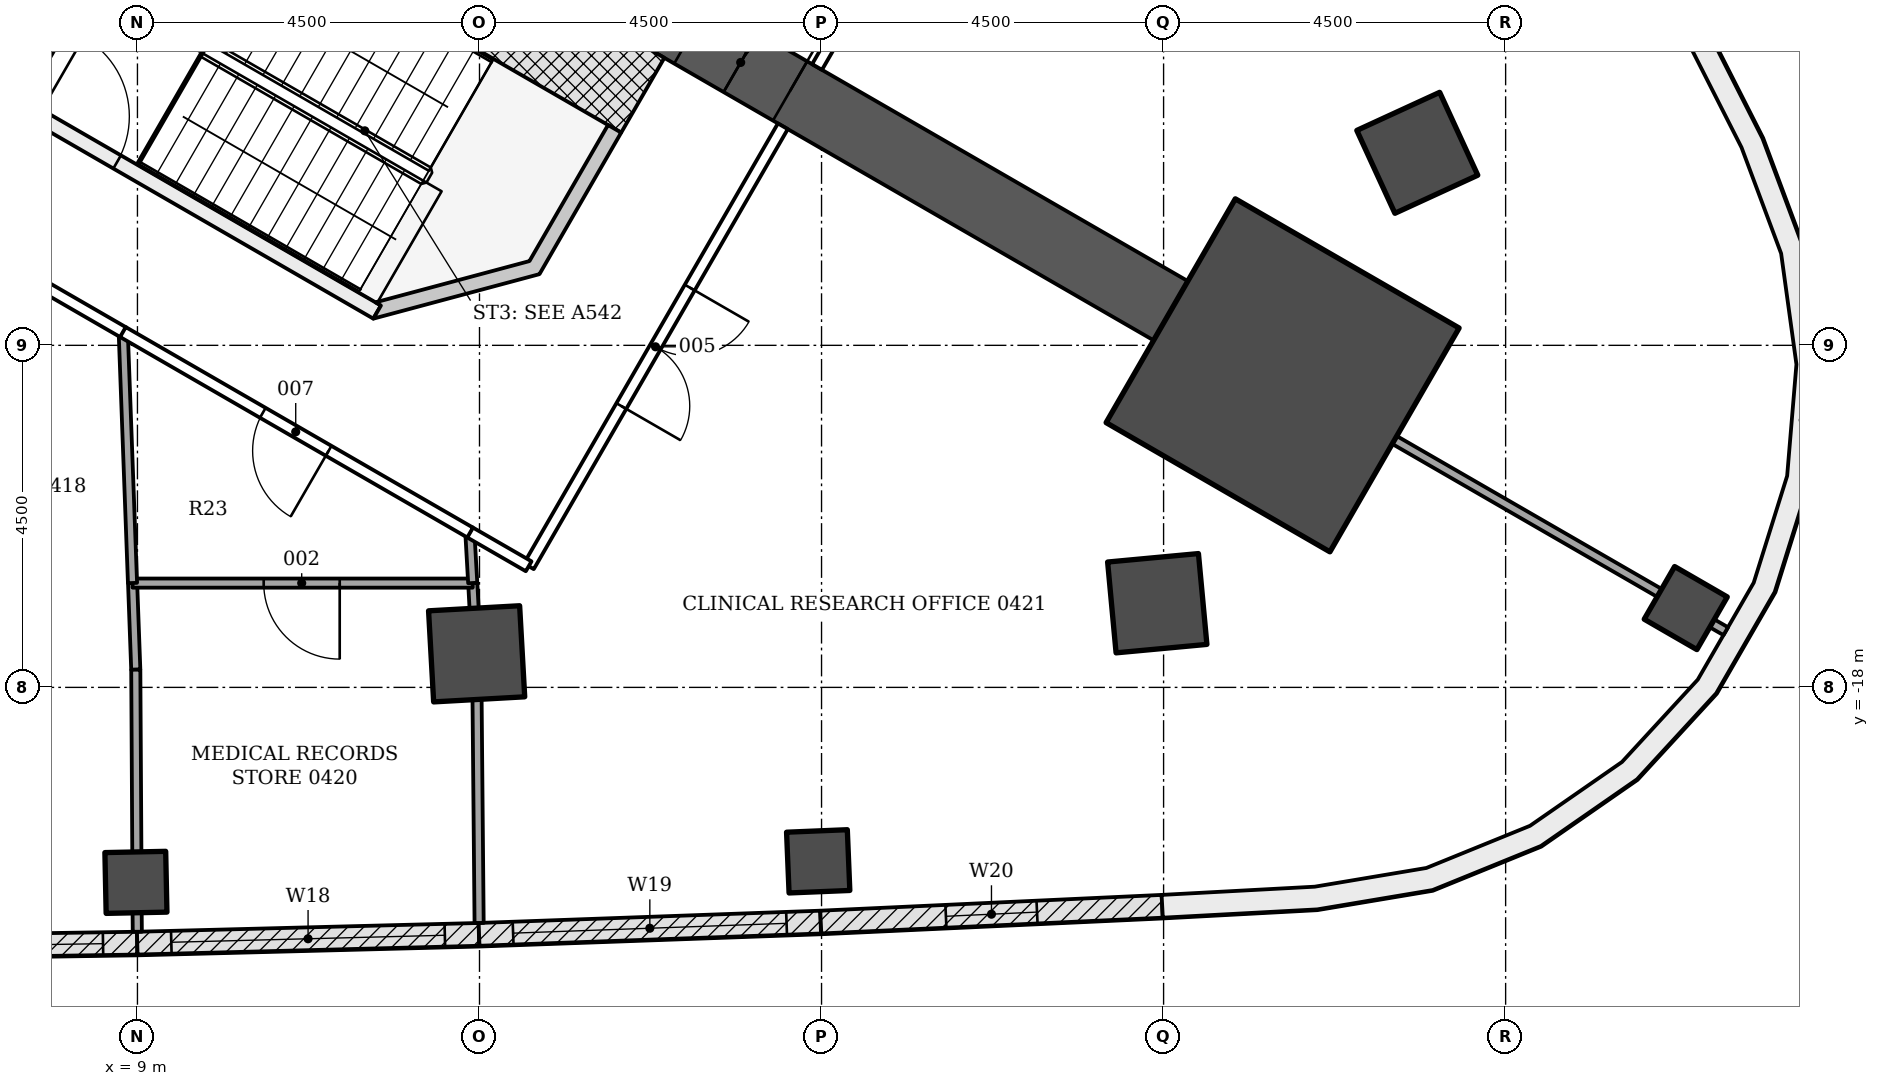
"""IFC4 building model, lengths in metres.
Left out: names, types, materials, properties, quantities, classifications, styles, units other than length and angle.
Written with IfcOpenShell. Run it as: python <this file> out.ifc"""

import sys

from ifc_helpers import new_model, si_unit, direction, frame, frame_2d, origin, origin_2d, place, context, subcontext, project, spatial, polyline, rectangle, outline, extrude, element, fill, save


model = new_model("IFC4")
c1 = context("Model", 3, precision=1e-05, world=origin(), true_north=direction((0.0, 1.0)))
c2 = subcontext(c1, "Body", "Model", "MODEL_VIEW")
j1 = project(units=[si_unit("LENGTHUNIT", "METRE"), si_unit("PLANEANGLEUNIT", "RADIAN")], contexts=[c1])
p1 = place(None, origin())
s1 = spatial("IfcSite", under=j1, at=p1, CompositionType="ELEMENT")
p2 = place(p1, origin())
s2 = spatial("IfcBuilding", under=s1, at=p2, CompositionType="ELEMENT")
p3 = place(p2, frame((0.0, 0.0, 19.5)))
s3 = spatial("IfcBuildingStorey", under=s2, at=p3, CompositionType="ELEMENT", Elevation=19.5)
for number, where, z_axis, x_axis in (
    (1, (13.462, -17.558, -0.25), (0.0, 0.0, 1.0), (0.056, -0.998, 0.0)),
    (2, (22.417, -16.893, -0.25), (0.0, 0.0, 1.0), (0.093, -0.996, 0.0)),
    (3, (25.838, -10.967, -0.25), (0.0, 0.0, 1.0), (0.909, 0.418, 0.0)),
):
    element("IfcColumn", number, at=place(p3, frame(where, z_axis=z_axis, x_axis=x_axis)), inside=s3, PredefinedType="COLUMN", context=c2, shape_type="SweptSolid", body=[
        extrude(rectangle(XDim=1.2, YDim=1.2, at=origin_2d()), origin(), (0.0, 0.0, 1.0), 4.55),
    ])
for number, where, z_axis, x_axis in (
    (4, (8.98, -20.565, -0.25), (0.0, 0.0, 1.0), (0.021, -1.0, 0.0)),
    (5, (17.956, -20.288, -0.25), (0.0, 0.0, 1.0), (0.041, -0.999, 0.0)),
    (6, (29.37, -16.957, -0.25), (0.0, 0.0, 1.0), (0.866, -0.5, 0.0)),
):
    element("IfcColumn", number, at=place(p3, frame(where, z_axis=z_axis, x_axis=x_axis)), inside=s3, PredefinedType="COLUMN", context=c2, shape_type="SweptSolid", body=[
        extrude(rectangle(XDim=0.8, YDim=0.8, at=origin_2d()), origin(), (0.0, 0.0, 1.0), 4.55),
    ])
p4 = place(p3, frame((9.922, -5.728, -0.25), z_axis=(0.0, 0.0, 1.0), x_axis=(0.866028046028, -0.499995423472, 0.0)))
e7 = element("IfcWall", 7, at=p4, inside=s3, PredefinedType="SHEAR", context=c2, shape_type="SweptSolid", body=[
    extrude(rectangle(XDim=14.633, YDim=0.9, at=frame_2d((7.316, 0.0))), origin(), (0.0, 0.0, 1.0), 4.55),
])
p5 = place(p4, frame((7.35, 0.0, 0.25)))
e8 = element("IfcOpeningElement", 8, at=p5, cuts=e7, PredefinedType="OPENING", context=c2, shape_type="SweptSolid", body=[
    extrude(rectangle(XDim=1.5, YDim=2.1, at=frame_2d((0.75, 1.05))), frame((0.0, 0.46, 0.0), z_axis=(0.0, -1.0, 0.0), x_axis=(1.0, 0.0, 0.0)), (0.0, 0.0, 1.0), 0.92),
])
p6 = place(p3, frame((24.066, -13.895, -0.25), z_axis=(0.0, 0.0, 1.0), x_axis=(0.866025403784, -0.5, 0.0)))
e9 = element("IfcColumn", 9, at=p6, inside=s3, PredefinedType="COLUMN", context=c2, shape_type="SweptSolid", body=[
    extrude(rectangle(XDim=3.4, YDim=3.4, at=origin_2d()), origin(), (0.0, 0.0, 1.0), 4.55),
])
p7 = place(p3, frame((8.995, -21.365, 0.0), z_axis=(0.0, 0.0, 1.0), x_axis=(-0.999881921814, -0.015366926462, 0.0)))
e10 = element("IfcWall", 10, at=p7, inside=s3, PredefinedType="NOTDEFINED", context=c2, shape_type="SweptSolid", body=[
    extrude(rectangle(XDim=4.496, YDim=0.3, at=frame_2d((2.248, 0.0))), origin(), (0.0, 0.0, 1.0), 4.3),
])
p8 = place(p7, frame((0.448, 0.0, 1.5)))
e11 = element("IfcOpeningElement", 11, at=p8, cuts=e10, PredefinedType="OPENING", context=c2, shape_type="SweptSolid", body=[
    extrude(rectangle(XDim=3.6, YDim=1.8, at=frame_2d((1.8, 0.9))), frame((0.0, 0.16, 0.0), z_axis=(0.0, -1.0, 0.0), x_axis=(1.0, 0.0, 0.0)), (0.0, 0.0, 1.0), 0.32),
])
p9 = place(p3, frame((13.492, -21.25, 0.0), z_axis=(0.0, 0.0, 1.0), x_axis=(-0.999671466587, -0.025631209312, 0.0)))
e12 = element("IfcWall", 12, at=p9, inside=s3, PredefinedType="NOTDEFINED", context=c2, shape_type="SweptSolid", body=[
    extrude(rectangle(XDim=4.496, YDim=0.3, at=frame_2d((2.248, 0.0))), origin(), (0.0, 0.0, 1.0), 4.3),
])
p10 = place(p9, frame((0.448, 0.0, 1.5)))
e13 = element("IfcOpeningElement", 13, at=p10, cuts=e12, PredefinedType="OPENING", context=c2, shape_type="SweptSolid", body=[
    extrude(rectangle(XDim=3.6, YDim=1.8, at=frame_2d((1.8, 0.9))), frame((0.0, 0.16, 0.0), z_axis=(0.0, -1.0, 0.0), x_axis=(1.0, 0.0, 0.0)), (0.0, 0.0, 1.0), 0.32),
])
p11 = place(p3, frame((17.988, -21.088, 0.0), z_axis=(0.0, 0.0, 1.0), x_axis=(-0.999355640029, -0.035892962294, 0.0)))
e14 = element("IfcWall", 14, at=p11, inside=s3, PredefinedType="NOTDEFINED", context=c2, shape_type="SweptSolid", body=[
    extrude(rectangle(XDim=4.496, YDim=0.3, at=frame_2d((2.248, 0.0))), origin(), (0.0, 0.0, 1.0), 4.3),
])
p12 = place(p11, frame((0.448, 0.0, 1.5)))
e15 = element("IfcOpeningElement", 15, at=p12, cuts=e14, PredefinedType="OPENING", context=c2, shape_type="SweptSolid", body=[
    extrude(rectangle(XDim=3.6, YDim=1.8, at=frame_2d((1.8, 0.9))), frame((0.0, 0.16, 0.0), z_axis=(0.0, -1.0, 0.0), x_axis=(1.0, 0.0, 0.0)), (0.0, 0.0, 1.0), 0.32),
])
p13 = place(p3, frame((22.481, -20.88, 0.0), z_axis=(0.0, 0.0, 1.0), x_axis=(-0.998931717866, -0.046210637742, 0.0)))
e16 = element("IfcWall", 16, at=p13, inside=s3, PredefinedType="NOTDEFINED", context=c2, shape_type="SweptSolid", body=[
    extrude(rectangle(XDim=4.496, YDim=0.3, at=frame_2d((2.248, 0.0))), origin(), (0.0, 0.0, 1.0), 4.3),
])
p14 = place(p13, frame((1.648, 0.0, 0.8)))
e17 = element("IfcOpeningElement", 17, at=p14, cuts=e16, PredefinedType="OPENING", context=c2, shape_type="SweptSolid", body=[
    extrude(rectangle(XDim=1.2, YDim=3.0, at=frame_2d((0.6, 1.5))), frame((0.0, 0.16, 0.0), z_axis=(0.0, -1.0, 0.0), x_axis=(1.0, 0.0, 0.0)), (0.0, 0.0, 1.0), 0.32),
])
p15 = place(p3, origin())
e18 = element("IfcWall", 18, at=p15, inside=s3, PredefinedType="NOTDEFINED", context=c2, shape_type="SweptSolid", body=[
    extrude(outline(polyline([(22.49, -21.03), (24.522, -20.921), (26.04, -20.666), (27.465, -20.086), (28.729, -19.209), (29.771, -18.077), (30.54, -16.744), (31.0, -15.276), (31.128, -13.742), (30.917, -12.218), (30.379, -10.776), (29.457, -8.962), (29.19, -9.098), (30.104, -10.897), (30.625, -12.292), (30.826, -13.75), (30.704, -15.218), (30.264, -16.623), (29.528, -17.898), (28.531, -18.981), (27.321, -19.821), (25.957, -20.376), (24.489, -20.622), (22.474, -20.73), (22.49, -21.03)])), origin(), (0.0, 0.0, 1.0), 4.3),
])
p16 = place(p3, frame((7.44, -10.226, -0.25), z_axis=(0.0, 0.0, 1.0), x_axis=(0.500022077904, 0.866012656725, 0.0)))
e19 = element("IfcWall", 19, at=p16, inside=s3, PredefinedType="SHEAR", context=c2, shape_type="SweptSolid", body=[
    extrude(rectangle(XDim=3.55, YDim=0.2, at=frame_2d((1.775, 0.0))), origin(), (0.0, 0.0, 1.0), 4.55),
])
p17 = place(p16, frame((1.175, 0.0, 0.25)))
e20 = element("IfcOpeningElement", 20, at=p17, cuts=e19, PredefinedType="OPENING", context=c2, shape_type="SweptSolid", body=[
    extrude(rectangle(XDim=1.2, YDim=2.1, at=frame_2d((0.6, 1.05))), frame((0.0, 0.11, 0.0), z_axis=(0.0, -1.0, 0.0), x_axis=(1.0, 0.0, 0.0)), (0.0, 0.0, 1.0), 0.22),
])
p18 = place(p3, frame((7.304, -10.262, -0.25), z_axis=(0.0, 0.0, 1.0), x_axis=(0.866026594901, -0.49999793692, 0.0)))
e21 = element("IfcWall", 21, at=p18, inside=s3, PredefinedType="SHEAR", context=c2, shape_type="SweptSolid", body=[
    extrude(rectangle(XDim=5.6, YDim=0.2, at=frame_2d((2.8, 0.0))), origin(), (0.0, 0.0, 1.0), 4.55),
])
p19 = place(p18, frame((0.45, 0.0, 0.25)))
e22 = element("IfcOpeningElement", 22, at=p19, cuts=e21, PredefinedType="OPENING", context=c2, shape_type="SweptSolid", body=[
    extrude(rectangle(XDim=1.2, YDim=2.1, at=frame_2d((0.6, 1.05))), frame((0.0, 0.11, 0.0), z_axis=(0.0, -1.0, 0.0), x_axis=(1.0, 0.0, 0.0)), (0.0, 0.0, 1.0), 0.22),
])
p20 = place(p3, frame((9.413, -6.61, -0.25), z_axis=(0.0, 0.0, 1.0), x_axis=(0.866018442252, -0.500012057535, 0.0)))
e23 = element("IfcWall", 23, at=p20, inside=s3, PredefinedType="SHEAR", context=c2, shape_type="SweptSolid", body=[
    extrude(rectangle(XDim=7.2, YDim=1.136, at=frame_2d((3.6, 0.0))), origin(), (0.0, 0.0, 1.0), 4.55),
])
p21 = place(p3, frame((0.0, 0.0, -0.25)))
e24 = element("IfcWall", 24, at=p21, inside=s3, PredefinedType="SHEAR", context=c2, shape_type="SweptSolid", body=[
    extrude(outline(polyline([(12.104, -13.149), (14.289, -12.563), (15.364, -10.701), (15.191, -10.601), (14.157, -12.392), (12.132, -12.934), (12.204, -12.976), (12.204, -12.976), (12.204, -12.976), (12.204, -12.976), (12.204, -12.976), (12.204, -12.976), (12.204, -12.976), (12.204, -12.976), (12.204, -12.976), (12.204, -12.976), (12.204, -12.976), (12.204, -12.976), (12.204, -12.976), (12.204, -12.976), (12.204, -12.976), (12.204, -12.976), (12.204, -12.976), (12.104, -13.149)])), origin(), (0.0, 0.0, 1.0), 4.55),
])
p22 = place(p3, frame((13.429, -16.959, 0.0), z_axis=(0.0, 0.0, 1.0), x_axis=(-0.053857579026, 0.998548627349, 0.0)))
e25 = element("IfcWall", 25, at=p22, inside=s3, PredefinedType="PARTITIONING", context=c2, shape_type="SweptSolid", body=[
    extrude(rectangle(XDim=0.335, YDim=0.12, at=frame_2d((0.168, 0.0))), origin(), (0.0, 0.0, 1.0), 3.894),
])
p23 = place(p3, frame((13.495, -21.099, 0.0), z_axis=(0.0, 0.0, 1.0), x_axis=(-0.009216581037, 0.999957526415, 0.0)))
e26 = element("IfcWall", 26, at=p23, inside=s3, PredefinedType="PARTITIONING", context=c2, shape_type="SweptSolid", body=[
    extrude(rectangle(XDim=2.94, YDim=0.12, at=frame_2d((1.47, 0.0))), origin(), (0.0, 0.0, 1.0), 3.683),
])
p24 = place(p3, frame((8.936, -16.624, 0.0), z_axis=(0.0, 0.0, 1.0), x_axis=(0.036711673362, -0.999325899314, 0.0)))
e27 = element("IfcWall", 27, at=p24, inside=s3, PredefinedType="PARTITIONING", context=c2, shape_type="SweptSolid", body=[
    extrude(rectangle(XDim=1.144, YDim=0.12, at=frame_2d((0.572, 0.0))), origin(), (0.0, 0.0, 1.0), 3.18),
])
p25 = place(p3, frame((8.978, -17.767, 0.0), z_axis=(0.0, 0.0, 1.0), x_axis=(0.005803200997, -0.999983161287, 0.0)))
e28 = element("IfcWall", 28, at=p25, inside=s3, PredefinedType="PARTITIONING", context=c2, shape_type="SweptSolid", body=[
    extrude(rectangle(XDim=2.398, YDim=0.12, at=frame_2d((1.199, 0.0))), origin(), (0.0, 0.0, 1.0), 3.18),
])
p26 = place(p3, frame((8.996, -20.965, 0.0), z_axis=(0.0, 0.0, 1.0), x_axis=(0.007812261592, -0.999969483819, 0.0)))
e29 = element("IfcWall", 29, at=p26, inside=s3, PredefinedType="PARTITIONING", context=c2, shape_type="SweptSolid", body=[
    extrude(rectangle(XDim=0.25, YDim=0.12, at=frame_2d((0.125, 0.0))), origin(), (0.0, 0.0, 1.0), 4.3),
])
p27 = place(p3, frame((13.411, -16.628, 0.0), z_axis=(0.0, 0.0, 1.0), x_axis=(-1.0, 0.0, 0.0)))
e30 = element("IfcWall", 30, at=p27, inside=s3, PredefinedType="PARTITIONING", context=c2, shape_type="SweptSolid", body=[
    extrude(rectangle(XDim=4.476, YDim=0.12, at=frame_2d((2.238, 0.0))), origin(), (0.0, 0.0, 1.0), 3.843),
])
p28 = place(p27, frame((1.75, 0.0, 0.0)))
e31 = element("IfcOpeningElement", 31, at=p28, cuts=e30, PredefinedType="OPENING", context=c2, shape_type="SweptSolid", body=[
    extrude(rectangle(XDim=1.0, YDim=2.1, at=frame_2d((0.5, 1.05))), frame((0.0, 0.07, 0.0), z_axis=(0.0, -1.0, 0.0), x_axis=(1.0, 0.0, 0.0)), (0.0, 0.0, 1.0), 0.14),
])
p29 = place(p3, frame((13.373, -15.961, 0.0), z_axis=(0.0, 0.0, 1.0), x_axis=(0.056726690049, -0.998389744857, 0.0)))
e32 = element("IfcWall", 32, at=p29, inside=s3, PredefinedType="PARTITIONING", context=c2, shape_type="SweptSolid", body=[
    extrude(rectangle(XDim=0.667, YDim=0.12, at=frame_2d((0.333, 0.0))), origin(), (0.0, 0.0, 1.0), 3.894),
])
p30 = place(p3, frame((17.491, -10.618, 0.0), z_axis=(0.0, 0.0, 1.0), x_axis=(-0.499969057507, -0.866043267704, 0.0)))
e33 = element("IfcWall", 33, at=p30, inside=s3, PredefinedType="PARTITIONING", context=c2, shape_type="SweptSolid", body=[
    extrude(rectangle(XDim=6.685, YDim=0.15, at=frame_2d((3.342, 0.0))), origin(), (0.0, 0.0, 1.0), 3.843),
])
p31 = place(p30, frame((2.45, 0.0, 0.0)))
e34 = element("IfcOpeningElement", 34, at=p31, cuts=e33, PredefinedType="OPENING", context=c2, shape_type="SweptSolid", body=[
    extrude(rectangle(XDim=1.8, YDim=2.1, at=frame_2d((0.9, 1.05))), frame((0.0, 0.085, 0.0), z_axis=(0.0, -1.0, 0.0), x_axis=(1.0, 0.0, 0.0)), (0.0, 0.0, 1.0), 0.17),
])
p32 = place(p3, frame((14.147, -16.407, 0.0), z_axis=(0.0, 0.0, 1.0), x_axis=(-0.866276218641, 0.499565324075, 0.0)))
e35 = element("IfcWall", 35, at=p32, inside=s3, PredefinedType="PARTITIONING", context=c2, shape_type="SweptSolid", body=[
    extrude(rectangle(XDim=0.897, YDim=0.15, at=frame_2d((0.448, 0.0))), origin(), (0.0, 0.0, 1.0), 3.894),
])
p33 = place(p3, frame((29.023, -16.757, 0.0), z_axis=(0.0, 0.0, 1.0), x_axis=(-0.866027971625, 0.499995552344, 0.0)))
e36 = element("IfcWall", 36, at=p33, inside=s3, PredefinedType="PARTITIONING", context=c2, shape_type="SweptSolid", body=[
    extrude(rectangle(XDim=4.024, YDim=0.12, at=frame_2d((2.012, 0.0))), origin(), (0.0, 0.0, 1.0), 3.767),
])
p34 = place(p3, frame((29.896, -17.261, 0.0), z_axis=(0.0, 0.0, 1.0), x_axis=(-0.865774595023, 0.500434162116, 0.0)))
e37 = element("IfcWall", 37, at=p34, inside=s3, PredefinedType="PARTITIONING", context=c2, shape_type="SweptSolid", body=[
    extrude(rectangle(XDim=0.208, YDim=0.12, at=frame_2d((0.104, 0.0))), origin(), (0.0, 0.0, 1.0), 4.3),
])
p35 = place(p3, frame((8.935, -16.627, 0.0), z_axis=(0.0, 0.0, 1.0), x_axis=(-0.036989770664, 0.999315644262, 0.0)))
e38 = element("IfcWall", 38, at=p35, inside=s3, PredefinedType="PARTITIONING", context=c2, shape_type="SweptSolid", body=[
    extrude(rectangle(XDim=3.3, YDim=0.12, at=frame_2d((1.65, 0.0))), origin(), (0.0, 0.0, 1.0), 3.843),
])
p36 = place(p3, frame((8.817, -13.33, 0.0), z_axis=(0.0, 0.0, 1.0), x_axis=(-0.865999736111, 0.50004445508, 0.0)))
e39 = element("IfcWall", 39, at=p36, inside=s3, PredefinedType="PARTITIONING", context=c2, shape_type="SweptSolid", body=[
    extrude(rectangle(XDim=2.844, YDim=0.15, at=frame_2d((1.422, 0.0))), origin(), (0.0, 0.0, 1.0), 3.843),
])
p37 = place(p3, frame((13.377, -15.963, 0.0), z_axis=(0.0, 0.0, 1.0), x_axis=(-0.865969754012, 0.500096375847, 0.0)))
e40 = element("IfcWall", 40, at=p37, inside=s3, PredefinedType="PARTITIONING", context=c2, shape_type="SweptSolid", body=[
    extrude(rectangle(XDim=5.275, YDim=0.15, at=frame_2d((2.637, 0.0))), origin(), (0.0, 0.0, 1.0), 3.843),
])
p38 = place(p37, frame((2.15, 0.0, 0.0)))
e41 = element("IfcOpeningElement", 41, at=p38, cuts=e40, PredefinedType="OPENING", context=c2, shape_type="SweptSolid", body=[
    extrude(rectangle(XDim=1.0, YDim=2.1, at=frame_2d((0.5, 1.05))), frame((0.0, 0.085, 0.0), z_axis=(0.0, -1.0, 0.0), x_axis=(1.0, 0.0, 0.0)), (0.0, 0.0, 1.0), 0.17),
])
p39 = place(p3, frame((18.84, -8.281, 0.0), z_axis=(0.0, 0.0, 1.0), x_axis=(-0.500126010714, -0.86595263924, 0.0)))
e42 = element("IfcWall", 42, at=p39, inside=s3, PredefinedType="PARTITIONING", context=c2, shape_type="SweptSolid", body=[
    extrude(rectangle(XDim=1.798, YDim=0.15, at=frame_2d((0.899, 0.0))), origin(), (0.0, 0.0, 1.0), 3.843),
])
p40 = place(p8, origin())
e43 = element("IfcWindow", 43, at=p40, inside=s3, PartitioningType="SINGLE_PANEL", PredefinedType="WINDOW", context=c2, shape_type="SweptSolid", body=[
    extrude(rectangle(XDim=3.6, YDim=1.8, at=frame_2d((1.8, 0.9))), frame((0.0, 0.03, 0.0), z_axis=(0.0, -1.0, 0.0), x_axis=(1.0, 0.0, 0.0)), (0.0, 0.0, 1.0), 0.06),
])
fill(e11, e43)
p41 = place(p10, origin())
e44 = element("IfcWindow", 44, at=p41, inside=s3, PartitioningType="SINGLE_PANEL", PredefinedType="WINDOW", context=c2, shape_type="SweptSolid", body=[
    extrude(rectangle(XDim=3.6, YDim=1.8, at=frame_2d((1.8, 0.9))), frame((0.0, 0.03, 0.0), z_axis=(0.0, -1.0, 0.0), x_axis=(1.0, 0.0, 0.0)), (0.0, 0.0, 1.0), 0.06),
])
fill(e13, e44)
p42 = place(p12, origin())
e45 = element("IfcWindow", 45, at=p42, inside=s3, PartitioningType="SINGLE_PANEL", PredefinedType="WINDOW", context=c2, shape_type="SweptSolid", body=[
    extrude(rectangle(XDim=3.6, YDim=1.8, at=frame_2d((1.8, 0.9))), frame((0.0, 0.03, 0.0), z_axis=(0.0, -1.0, 0.0), x_axis=(1.0, 0.0, 0.0)), (0.0, 0.0, 1.0), 0.06),
])
fill(e15, e45)
p43 = place(p14, origin())
e46 = element("IfcWindow", 46, at=p43, inside=s3, PartitioningType="SINGLE_PANEL", PredefinedType="WINDOW", context=c2, shape_type="SweptSolid", body=[
    extrude(rectangle(XDim=1.2, YDim=3.0, at=frame_2d((0.6, 1.5))), frame((0.0, 0.03, 0.0), z_axis=(0.0, -1.0, 0.0), x_axis=(1.0, 0.0, 0.0)), (0.0, 0.0, 1.0), 0.06),
])
fill(e17, e46)
p44 = place(p19, origin())
e47 = element("IfcDoor", 47, at=p44, inside=s3, OperationType="SINGLE_SWING_LEFT", PredefinedType="DOOR", context=c2, shape_type="SweptSolid", body=[
    extrude(rectangle(XDim=1.2, YDim=2.1, at=frame_2d((0.6, 1.05))), frame((0.0, 0.025, 0.0), z_axis=(0.0, -1.0, 0.0), x_axis=(1.0, 0.0, 0.0)), (0.0, 0.0, 1.0), 0.05),
])
fill(e22, e47)
p45 = place(p28, origin())
e48 = element("IfcDoor", 48, at=p45, inside=s3, OperationType="SINGLE_SWING_RIGHT", PredefinedType="DOOR", context=c2, shape_type="SweptSolid", body=[
    extrude(rectangle(XDim=1.0, YDim=2.1, at=frame_2d((0.5, 1.05))), frame((0.0, 0.025, 0.0), z_axis=(0.0, -1.0, 0.0), x_axis=(1.0, 0.0, 0.0)), (0.0, 0.0, 1.0), 0.05),
])
fill(e31, e48)
p46 = place(p31, origin())
e49 = element("IfcDoor", 49, at=p46, inside=s3, OperationType="DOUBLE_DOOR_SINGLE_SWING", PredefinedType="DOOR", context=c2, shape_type="SweptSolid", body=[
    extrude(rectangle(XDim=1.8, YDim=2.1, at=frame_2d((0.9, 1.05))), frame((0.0, 0.025, 0.0), z_axis=(0.0, -1.0, 0.0), x_axis=(1.0, 0.0, 0.0)), (0.0, 0.0, 1.0), 0.05),
])
fill(e34, e49)
p47 = place(p38, origin())
e50 = element("IfcDoor", 50, at=p47, inside=s3, OperationType="SINGLE_SWING_RIGHT", PredefinedType="DOOR", context=c2, shape_type="SweptSolid", body=[
    extrude(rectangle(XDim=1.0, YDim=2.1, at=frame_2d((0.5, 1.05))), frame((0.0, 0.025, 0.0), z_axis=(0.0, -1.0, 0.0), x_axis=(1.0, 0.0, 0.0)), (0.0, 0.0, 1.0), 0.05),
])
fill(e41, e50)
p48 = place(p5, origin())
e51 = element("IfcDoor", 51, at=p48, inside=s3, OperationType="DOUBLE_DOOR_SINGLE_SWING", PredefinedType="DOOR", context=c2, shape_type="SweptSolid", body=[
    extrude(rectangle(XDim=1.5, YDim=2.1, at=frame_2d((0.75, 1.05))), frame((0.0, 0.025, 0.0), z_axis=(0.0, -1.0, 0.0), x_axis=(1.0, 0.0, 0.0)), (0.0, 0.0, 1.0), 0.05),
])
fill(e8, e51)
save(model, sys.argv[1])
